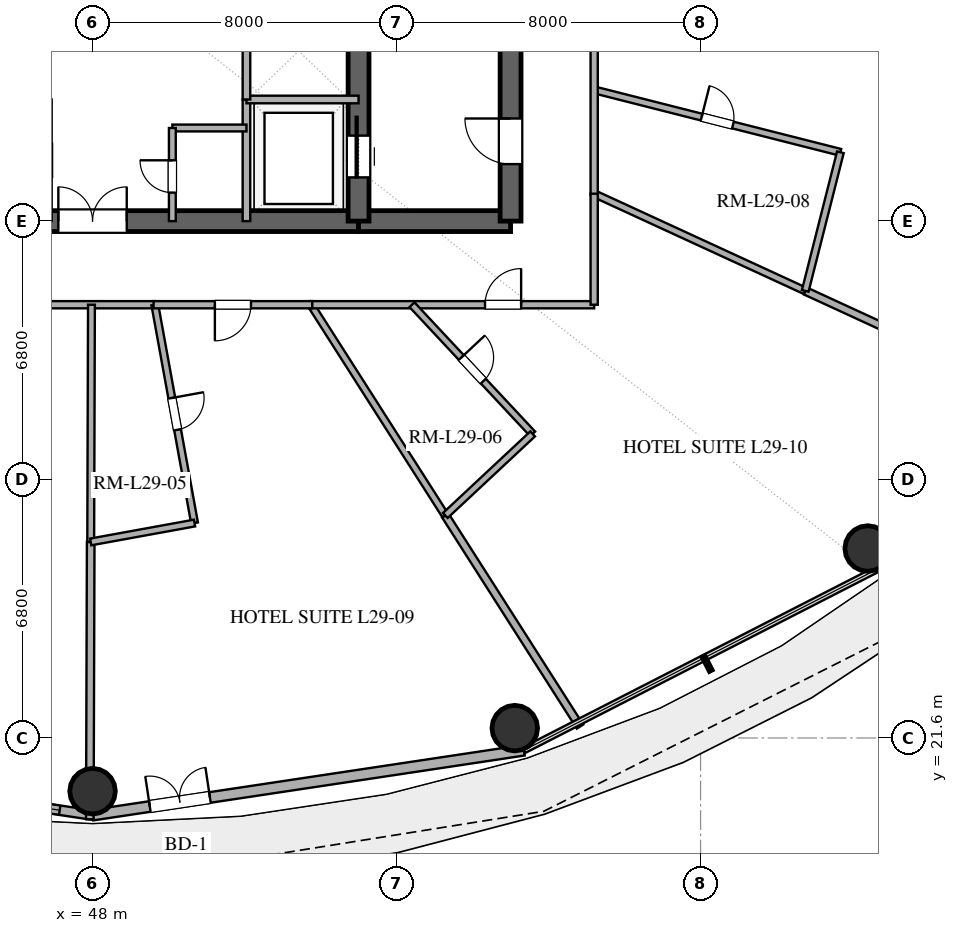
"""IFC4 building model, lengths in metres.
Left out: names, types, materials, properties, quantities, classifications, styles, units other than length and angle.
Written with IfcOpenShell. Run it as: python <this file> out.ifc"""

import sys

from ifc_helpers import new_model, si_unit, direction, frame, frame_2d, origin, origin_2d, place, context, subcontext, project, spatial, rectangle, hollow_circle, extrude, element, fill, save


model = new_model("IFC4")
c1 = context("Model", 3, precision=1e-05, world=origin(), true_north=direction((0.0, 1.0)))
c2 = subcontext(c1, "Body", "Model", "MODEL_VIEW")
j1 = project(units=[si_unit("LENGTHUNIT", "METRE"), si_unit("PLANEANGLEUNIT", "RADIAN")], contexts=[c1])
p1 = place(None, origin())
s1 = spatial("IfcSite", under=j1, at=p1, CompositionType="ELEMENT")
p2 = place(p1, origin())
s2 = spatial("IfcBuilding", under=s1, at=p2, CompositionType="ELEMENT")
p3 = place(p2, frame((0.0, 0.0, 116.4)))
s3 = spatial("IfcBuildingStorey", under=s2, at=p3, CompositionType="ELEMENT", Elevation=116.4)
p4 = place(p3, frame((41.0, 35.2, 0.0), z_axis=(0.0, 0.0, 1.0), x_axis=(1.0, 0.0, 0.0)))
e1 = element("IfcWall", 1, at=p4, inside=s3, PredefinedType="SHEAR", context=c2, shape_type="SweptSolid", body=[
    extrude(rectangle(XDim=14.0, YDim=0.55, at=frame_2d((7.0, 0.0))), origin(), (0.0, 0.0, 1.0), 3.38),
])
p5 = place(p4, frame((6.1, 0.0, 0.0)))
e2 = element("IfcOpeningElement", 2, at=p5, cuts=e1, PredefinedType="OPENING", context=c2, shape_type="SweptSolid", body=[
    extrude(rectangle(XDim=1.8, YDim=2.25, at=frame_2d((0.9, 1.125))), frame((0.0, 0.285, 0.0), z_axis=(0.0, -1.0, 0.0), x_axis=(1.0, 0.0, 0.0)), (0.0, 0.0, 1.0), 0.57),
])
p6 = place(p3, frame((55.0, 35.2, 0.0), z_axis=(0.0, 0.0, 1.0), x_axis=(1.0, 0.0, 0.0)))
e3 = element("IfcWall", 3, at=p6, inside=s3, PredefinedType="SHEAR", context=c2, shape_type="SweptSolid", body=[
    extrude(rectangle(XDim=4.0, YDim=0.55, at=frame_2d((2.0, 0.0))), origin(), (0.0, 0.0, 1.0), 3.38),
])
p7 = place(p3, frame((59.0, 35.2, 0.0), z_axis=(0.0, 0.0, 1.0), x_axis=(0.0, 1.0, 0.0)))
e4 = element("IfcWall", 4, at=p7, inside=s3, PredefinedType="SHEAR", context=c2, shape_type="SweptSolid", body=[
    extrude(rectangle(XDim=13.6, YDim=0.55, at=frame_2d((6.8, 0.0))), origin(), (0.0, 0.0, 1.0), 3.38),
])
p8 = place(p7, frame((1.5, 0.0, 0.0)))
e5 = element("IfcOpeningElement", 5, at=p8, cuts=e4, PredefinedType="OPENING", context=c2, shape_type="SweptSolid", body=[
    extrude(rectangle(XDim=1.2, YDim=2.15, at=frame_2d((0.6, 1.075))), frame((0.0, 0.285, 0.0), z_axis=(0.0, -1.0, 0.0), x_axis=(1.0, 0.0, 0.0)), (0.0, 0.0, 1.0), 0.57),
])
p9 = place(p3, frame((55.0, 35.2, 0.0), z_axis=(0.0, 0.0, 1.0), x_axis=(0.0, 1.0, 0.0)))
e6 = element("IfcWall", 6, at=p9, inside=s3, PredefinedType="SHEAR", context=c2, shape_type="SweptSolid", body=[
    extrude(rectangle(XDim=13.6, YDim=0.55, at=frame_2d((6.8, 0.0))), origin(), (0.0, 0.0, 1.0), 3.38),
])
p10 = place(p9, frame((1.15, 0.0, 0.0)))
e7 = element("IfcOpeningElement", 7, at=p10, cuts=e6, PredefinedType="OPENING", context=c2, shape_type="SweptSolid", body=[
    extrude(rectangle(XDim=1.1, YDim=2.2, at=frame_2d((0.55, 1.1))), frame((0.0, 0.285, 0.0), z_axis=(0.0, -1.0, 0.0), x_axis=(1.0, 0.0, 0.0)), (0.0, 0.0, 1.0), 0.57),
])
for number, where, z_axis, x_axis in (
    (8, (48.0, 20.2, 0.0), (0.0, 0.0, 1.0), (1.0, 0.0, 0.0)),
    (9, (59.11, 21.859, 0.0), (0.0, 0.0, 1.0), (1.0, 0.0, 0.0)),
    (10, (68.398, 26.585, 0.0), (0.0, 0.0, 1.0), (1.0, 0.0, 0.0)),
):
    element("IfcColumn", number, at=place(p3, frame(where, z_axis=z_axis, x_axis=x_axis)), inside=s3, PredefinedType="COLUMN", context=c2, shape_type="SweptSolid", body=[
        extrude(hollow_circle(Radius=0.6, WallThickness=0.032, at=origin_2d()), origin(), (0.0, 0.0, 1.0), 3.38),
    ])
p11 = place(p3, frame((36.649, 21.277, 0.0), z_axis=(0.0, 0.0, 1.0), x_axis=(0.988877774656, -0.148730450117, 0.0)))
e11 = element("IfcWall", 11, at=p11, inside=s3, PredefinedType="SOLIDWALL", context=c2, shape_type="SweptSolid", body=[
    extrude(rectangle(XDim=11.479, YDim=0.25, at=frame_2d((5.74, 0.0))), origin(), (0.0, 0.0, 1.0), 3.38),
])
p12 = place(p11, frame((9.605, 0.0, 1.42)))
e12 = element("IfcOpeningElement", 12, at=p12, cuts=e11, PredefinedType="OPENING", context=c2, shape_type="SweptSolid", body=[
    extrude(rectangle(XDim=1.0, YDim=1.05, at=frame_2d((0.5, 0.525))), frame((0.0, 0.135, 0.0), z_axis=(0.0, -1.0, 0.0), x_axis=(1.0, 0.0, 0.0)), (0.0, 0.0, 1.0), 0.27),
])
p13 = place(p3, frame((48.0, 19.57, 0.0), z_axis=(0.0, 0.0, 1.0), x_axis=(0.988877774656, 0.148730450117, 0.0)))
e13 = element("IfcWall", 13, at=p13, inside=s3, PredefinedType="SOLIDWALL", context=c2, shape_type="SweptSolid", body=[
    extrude(rectangle(XDim=11.479, YDim=0.28, at=frame_2d((5.74, 0.0))), origin(), (0.0, 0.0, 1.0), 3.38),
])
p14 = place(p13, frame((1.524, 0.0, 0.0)))
e14 = element("IfcOpeningElement", 14, at=p14, cuts=e13, PredefinedType="OPENING", context=c2, shape_type="SweptSolid", body=[
    extrude(rectangle(XDim=1.6, YDim=2.25, at=frame_2d((0.8, 1.125))), frame((0.0, 0.15, 0.0), z_axis=(0.0, -1.0, 0.0), x_axis=(1.0, 0.0, 0.0)), (0.0, 0.0, 1.0), 0.3),
])
p15 = place(p3, frame((52.05, 35.2, 0.0), z_axis=(0.0, 0.0, 1.0), x_axis=(0.0, 1.0, 0.0)))
e15 = element("IfcWall", 15, at=p15, inside=s3, PredefinedType="SOLIDWALL", context=c2, shape_type="SweptSolid", body=[
    extrude(rectangle(XDim=3.2, YDim=0.2, at=frame_2d((1.6, 0.0))), origin(), (0.0, 0.0, 1.0), 2.74),
])
p16 = place(p3, frame((52.05, 38.4, 0.0), z_axis=(0.0, 0.0, 1.0), x_axis=(1.0, 0.0, 0.0)))
e16 = element("IfcWall", 16, at=p16, inside=s3, PredefinedType="SOLIDWALL", context=c2, shape_type="SweptSolid", body=[
    extrude(rectangle(XDim=2.95, YDim=0.2, at=frame_2d((1.475, 0.0))), origin(), (0.0, 0.0, 1.0), 2.74),
])
p17 = place(p3, frame((52.05, 38.4, 0.0), z_axis=(0.0, 0.0, 1.0), x_axis=(0.0, 1.0, 0.0)))
e17 = element("IfcWall", 17, at=p17, inside=s3, PredefinedType="SOLIDWALL", context=c2, shape_type="SweptSolid", body=[
    extrude(rectangle(XDim=10.4, YDim=0.2, at=frame_2d((5.2, 0.0))), origin(), (0.0, 0.0, 1.0), 2.74),
])
p18 = place(p17, frame((8.2, 0.0, 0.0)))
e18 = element("IfcOpeningElement", 18, at=p18, cuts=e17, PredefinedType="OPENING", context=c2, shape_type="SweptSolid", body=[
    extrude(rectangle(XDim=1.2, YDim=2.2, at=frame_2d((0.6, 1.1))), frame((0.0, 0.11, 0.0), z_axis=(0.0, -1.0, 0.0), x_axis=(1.0, 0.0, 0.0)), (0.0, 0.0, 1.0), 0.22),
])
p19 = place(p3, frame((50.1, 37.65, 0.0), z_axis=(0.0, 0.0, 1.0), x_axis=(1.0, 0.0, 0.0)))
e19 = element("IfcWall", 19, at=p19, inside=s3, PredefinedType="PLUMBINGWALL", context=c2, shape_type="SweptSolid", body=[
    extrude(rectangle(XDim=1.95, YDim=0.18, at=frame_2d((0.975, 0.0))), origin(), (0.0, 0.0, 1.0), 2.74),
])
p20 = place(p3, frame((50.1, 35.2, 0.0), z_axis=(0.0, 0.0, 1.0), x_axis=(0.0, 1.0, 0.0)))
e20 = element("IfcWall", 20, at=p20, inside=s3, PredefinedType="PLUMBINGWALL", context=c2, shape_type="SweptSolid", body=[
    extrude(rectangle(XDim=2.45, YDim=0.18, at=frame_2d((1.225, 0.0))), origin(), (0.0, 0.0, 1.0), 2.74),
])
p21 = place(p20, frame((0.75, 0.0, 0.0)))
e21 = element("IfcOpeningElement", 21, at=p21, cuts=e20, PredefinedType="OPENING", context=c2, shape_type="SweptSolid", body=[
    extrude(rectangle(XDim=0.85, YDim=2.1, at=frame_2d((0.425, 1.05))), frame((0.0, 0.1, 0.0), z_axis=(0.0, -1.0, 0.0), x_axis=(1.0, 0.0, 0.0)), (0.0, 0.0, 1.0), 0.2),
])
p22 = place(p3, frame((47.928, 19.461, 0.0), z_axis=(0.0, 0.0, 1.0), x_axis=(0.003178198127, 0.999994949516, 0.0)))
e22 = element("IfcWall", 22, at=p22, inside=s3, PredefinedType="PARTITIONING", context=c2, shape_type="SweptSolid", body=[
    extrude(rectangle(XDim=7.298, YDim=0.2, at=frame_2d((3.649, 0.0))), origin(), (0.0, 0.0, 1.0), 2.74),
])
p23 = place(p3, frame((49.671, 33.0, 0.0), z_axis=(0.0, 0.0, 1.0), x_axis=(-1.0, 0.0, 0.0)))
e23 = element("IfcWall", 23, at=p23, inside=s3, PredefinedType="PARTITIONING", context=c2, shape_type="SweptSolid", body=[
    extrude(rectangle(XDim=14.871, YDim=0.19, at=frame_2d((7.436, 0.0))), origin(), (0.0, 0.0, 1.0), 2.74),
])
p24 = place(p23, frame((10.576, 0.0, 0.0)))
e24 = element("IfcOpeningElement", 24, at=p24, cuts=e23, PredefinedType="OPENING", context=c2, shape_type="SweptSolid", body=[
    extrude(rectangle(XDim=0.95, YDim=2.15, at=frame_2d((0.475, 1.075))), frame((0.0, 0.105, 0.0), z_axis=(0.0, -1.0, 0.0), x_axis=(1.0, 0.0, 0.0)), (0.0, 0.0, 1.0), 0.21),
])
p25 = place(p23, frame((4.101, 0.0, 0.0)))
e25 = element("IfcOpeningElement", 25, at=p25, cuts=e23, PredefinedType="OPENING", context=c2, shape_type="SweptSolid", body=[
    extrude(rectangle(XDim=1.0, YDim=2.2, at=frame_2d((0.5, 1.1))), frame((0.0, 0.105, 0.0), z_axis=(0.0, -1.0, 0.0), x_axis=(1.0, 0.0, 0.0)), (0.0, 0.0, 1.0), 0.21),
])
p26 = place(p3, frame((61.2, 38.653, 0.0), z_axis=(0.0, 0.0, 1.0), x_axis=(0.96932048276, -0.24580032893, 0.0)))
e26 = element("IfcWall", 26, at=p26, inside=s3, PredefinedType="PLUMBINGWALL", context=c2, shape_type="SweptSolid", body=[
    extrude(rectangle(XDim=6.684, YDim=0.18, at=frame_2d((3.342, 0.0))), origin(), (0.0, 0.0, 1.0), 2.74),
])
p27 = place(p26, frame((2.917, 0.0, 0.0)))
e27 = element("IfcOpeningElement", 27, at=p27, cuts=e26, PredefinedType="OPENING", context=c2, shape_type="SweptSolid", body=[
    extrude(rectangle(XDim=0.85, YDim=2.1, at=frame_2d((0.425, 1.05))), frame((0.0, 0.1, 0.0), z_axis=(0.0, -1.0, 0.0), x_axis=(1.0, 0.0, 0.0)), (0.0, 0.0, 1.0), 0.2),
])
p28 = place(p3, frame((60.828, 21.9, 0.0), z_axis=(0.0, 0.0, 1.0), x_axis=(-0.537968238966, 0.842965108331, 0.0)))
e28 = element("IfcWall", 28, at=p28, inside=s3, PredefinedType="PARTITIONING", context=c2, shape_type="SweptSolid", body=[
    extrude(rectangle(XDim=6.589, YDim=0.2, at=frame_2d((3.295, 0.0))), origin(), (0.0, 0.0, 1.0), 2.74),
])
p29 = place(p3, frame((57.283, 27.454, 0.0), z_axis=(0.0, 0.0, 1.0), x_axis=(-0.537984400251, 0.842954794213, 0.0)))
e29 = element("IfcWall", 29, at=p29, inside=s3, PredefinedType="PLUMBINGWALL", context=c2, shape_type="SweptSolid", body=[
    extrude(rectangle(XDim=6.579, YDim=0.18, at=frame_2d((3.29, 0.0))), origin(), (0.0, 0.0, 1.0), 2.74),
])
p30 = place(p3, frame((72.701, 30.624, 0.0), z_axis=(0.0, 0.0, 1.0), x_axis=(-0.9083071886, 0.418303778536, 0.0)))
e30 = element("IfcWall", 30, at=p30, inside=s3, PredefinedType="PARTITIONING", context=c2, shape_type="SweptSolid", body=[
    extrude(rectangle(XDim=6.548, YDim=0.2, at=frame_2d((3.274, 0.0))), origin(), (0.0, 0.0, 1.0), 2.74),
])
p31 = place(p3, frame((47.952, 26.758, 0.0), z_axis=(0.0, 0.0, 1.0), x_axis=(0.003168254458, 0.999994981069, 0.0)))
e31 = element("IfcWall", 31, at=p31, inside=s3, PredefinedType="PLUMBINGWALL", context=c2, shape_type="SweptSolid", body=[
    extrude(rectangle(XDim=6.242, YDim=0.18, at=frame_2d((3.121, 0.0))), origin(), (0.0, 0.0, 1.0), 2.74),
])
p32 = place(p3, frame((66.754, 33.363, 0.0), z_axis=(0.0, 0.0, 1.0), x_axis=(-0.908301480607, 0.418316172681, 0.0)))
e32 = element("IfcWall", 32, at=p32, inside=s3, PredefinedType="PLUMBINGWALL", context=c2, shape_type="SweptSolid", body=[
    extrude(rectangle(XDim=6.115, YDim=0.18, at=frame_2d((3.057, 0.0))), origin(), (0.0, 0.0, 1.0), 2.74),
])
p33 = place(p3, frame((49.638, 33.0, 0.0), z_axis=(0.0, 0.0, 1.0), x_axis=(0.179135653645, -0.983824383512, 0.0)))
e33 = element("IfcWall", 33, at=p33, inside=s3, PredefinedType="PLUMBINGWALL", context=c2, shape_type="SweptSolid", body=[
    extrude(rectangle(XDim=5.839, YDim=0.18, at=frame_2d((2.919, 0.0))), origin(), (0.0, 0.0, 1.0), 2.74),
])
p34 = place(p33, frame((2.494, 0.0, 0.0)))
e34 = element("IfcOpeningElement", 34, at=p34, cuts=e33, PredefinedType="OPENING", context=c2, shape_type="SweptSolid", body=[
    extrude(rectangle(XDim=0.85, YDim=2.1, at=frame_2d((0.425, 1.05))), frame((0.0, 0.1, 0.0), z_axis=(0.0, -1.0, 0.0), x_axis=(1.0, 0.0, 0.0)), (0.0, 0.0, 1.0), 0.2),
])
p35 = place(p3, frame((61.2, 46.45, 0.0), z_axis=(0.0, 0.0, 1.0), x_axis=(0.0, -1.0, 0.0)))
e35 = element("IfcWall", 35, at=p35, inside=s3, PredefinedType="PARTITIONING", context=c2, shape_type="SweptSolid", body=[
    extrude(rectangle(XDim=10.564, YDim=0.19, at=frame_2d((5.282, 0.0))), origin(), (0.0, 0.0, 1.0), 2.74),
])
p36 = place(p35, frame((4.722, 0.0, 0.0)))
e36 = element("IfcOpeningElement", 36, at=p36, cuts=e35, PredefinedType="OPENING", context=c2, shape_type="SweptSolid", body=[
    extrude(rectangle(XDim=0.95, YDim=2.15, at=frame_2d((0.475, 1.075))), frame((0.0, 0.105, 0.0), z_axis=(0.0, -1.0, 0.0), x_axis=(1.0, 0.0, 0.0)), (0.0, 0.0, 1.0), 0.21),
])
p37 = place(p3, frame((53.706, 33.0, 0.0), z_axis=(0.0, 0.0, 1.0), x_axis=(1.0, 0.0, 0.0)))
e37 = element("IfcWall", 37, at=p37, inside=s3, PredefinedType="PARTITIONING", context=c2, shape_type="SweptSolid", body=[
    extrude(rectangle(XDim=7.494, YDim=0.19, at=frame_2d((3.747, 0.0))), origin(), (0.0, 0.0, 1.0), 2.74),
])
p38 = place(p37, frame((4.622, 0.0, 0.0)))
e38 = element("IfcOpeningElement", 38, at=p38, cuts=e37, PredefinedType="OPENING", context=c2, shape_type="SweptSolid", body=[
    extrude(rectangle(XDim=0.95, YDim=2.15, at=frame_2d((0.475, 1.075))), frame((0.0, 0.105, 0.0), z_axis=(0.0, -1.0, 0.0), x_axis=(1.0, 0.0, 0.0)), (0.0, 0.0, 1.0), 0.21),
])
p39 = place(p3, frame((56.406, 33.0, 0.0), z_axis=(0.0, 0.0, 1.0), x_axis=(0.682578142961, -0.730812615348, 0.0)))
e39 = element("IfcWall", 39, at=p39, inside=s3, PredefinedType="PLUMBINGWALL", context=c2, shape_type="SweptSolid", body=[
    extrude(rectangle(XDim=4.652, YDim=0.18, at=frame_2d((2.326, 0.0))), origin(), (0.0, 0.0, 1.0), 2.74),
])
p40 = place(p39, frame((1.901, 0.0, 0.0)))
e40 = element("IfcOpeningElement", 40, at=p40, cuts=e39, PredefinedType="OPENING", context=c2, shape_type="SweptSolid", body=[
    extrude(rectangle(XDim=0.85, YDim=2.1, at=frame_2d((0.425, 1.05))), frame((0.0, 0.1, 0.0), z_axis=(0.0, -1.0, 0.0), x_axis=(1.0, 0.0, 0.0)), (0.0, 0.0, 1.0), 0.2),
])
p41 = place(p3, frame((53.782, 33.0, 0.0), z_axis=(0.0, 0.0, 1.0), x_axis=(-1.0, 0.0, 0.0)))
e41 = element("IfcWall", 41, at=p41, inside=s3, PredefinedType="PARTITIONING", context=c2, shape_type="SweptSolid", body=[
    extrude(rectangle(XDim=4.176, YDim=0.19, at=frame_2d((2.088, 0.0))), origin(), (0.0, 0.0, 1.0), 2.74),
])
p42 = place(p41, frame((1.613, 0.0, 0.0)))
e42 = element("IfcOpeningElement", 42, at=p42, cuts=e41, PredefinedType="OPENING", context=c2, shape_type="SweptSolid", body=[
    extrude(rectangle(XDim=0.95, YDim=2.15, at=frame_2d((0.475, 1.075))), frame((0.0, 0.105, 0.0), z_axis=(0.0, -1.0, 0.0), x_axis=(1.0, 0.0, 0.0)), (0.0, 0.0, 1.0), 0.21),
])
p43 = place(p3, frame((67.678, 37.01, 0.0), z_axis=(0.0, 0.0, 1.0), x_axis=(-0.245725202551, -0.969339530212, 0.0)))
e43 = element("IfcWall", 43, at=p43, inside=s3, PredefinedType="PLUMBINGWALL", context=c2, shape_type="SweptSolid", body=[
    extrude(rectangle(XDim=3.763, YDim=0.18, at=frame_2d((1.881, 0.0))), origin(), (0.0, 0.0, 1.0), 2.74),
])
p44 = place(p3, frame((59.581, 29.601, 0.0), z_axis=(0.0, 0.0, 1.0), x_axis=(-0.730840933831, -0.682547822088, 0.0)))
e44 = element("IfcWall", 44, at=p44, inside=s3, PredefinedType="PLUMBINGWALL", context=c2, shape_type="SweptSolid", body=[
    extrude(rectangle(XDim=3.145, YDim=0.18, at=frame_2d((1.572, 0.0))), origin(), (0.0, 0.0, 1.0), 2.74),
])
p45 = place(p3, frame((61.2, 33.0, 0.0), z_axis=(0.0, 0.0, 1.0), x_axis=(0.0, 1.0, 0.0)))
e45 = element("IfcWall", 45, at=p45, inside=s3, PredefinedType="PARTITIONING", context=c2, shape_type="SweptSolid", body=[
    extrude(rectangle(XDim=2.921, YDim=0.19, at=frame_2d((1.46, 0.0))), origin(), (0.0, 0.0, 1.0), 2.74),
])
p46 = place(p3, frame((50.684, 27.256, 0.0), z_axis=(0.0, 0.0, 1.0), x_axis=(-0.983824875987, -0.17913294892, 0.0)))
e46 = element("IfcWall", 46, at=p46, inside=s3, PredefinedType="PLUMBINGWALL", context=c2, shape_type="SweptSolid", body=[
    extrude(rectangle(XDim=2.778, YDim=0.18, at=frame_2d((1.389, 0.0))), origin(), (0.0, 0.0, 1.0), 2.74),
])
p47 = place(p14, origin())
e47 = element("IfcDoor", 47, at=p47, inside=s3, OperationType="DOUBLE_DOOR_SINGLE_SWING", PredefinedType="DOOR", context=c2, shape_type="SweptSolid", body=[
    extrude(rectangle(XDim=1.6, YDim=2.25, at=frame_2d((0.8, 1.125))), frame((0.0, 0.025, 0.0), z_axis=(0.0, -1.0, 0.0), x_axis=(1.0, 0.0, 0.0)), (0.0, 0.0, 1.0), 0.05),
])
fill(e14, e47)
p48 = place(p12, origin())
e48 = element("IfcWindow", 48, at=p48, inside=s3, PartitioningType="SINGLE_PANEL", PredefinedType="WINDOW", context=c2, shape_type="SweptSolid", body=[
    extrude(rectangle(XDim=1.0, YDim=1.05, at=frame_2d((0.5, 0.525))), frame((0.0, 0.03, 0.0), z_axis=(0.0, -1.0, 0.0), x_axis=(1.0, 0.0, 0.0)), (0.0, 0.0, 1.0), 0.06),
])
fill(e12, e48)
p49 = place(p10, origin())
e49 = element("IfcDoor", 49, at=p49, inside=s3, OperationType="SLIDING_TO_RIGHT", PredefinedType="DOOR", context=c2, shape_type="SweptSolid", body=[
    extrude(rectangle(XDim=1.1, YDim=2.2, at=frame_2d((0.55, 1.1))), frame((0.0, 0.025, 0.0), z_axis=(0.0, -1.0, 0.0), x_axis=(1.0, 0.0, 0.0)), (0.0, 0.0, 1.0), 0.05),
])
fill(e7, e49)
p50 = place(p8, origin())
e50 = element("IfcDoor", 50, at=p50, inside=s3, OperationType="SINGLE_SWING_RIGHT", PredefinedType="DOOR", context=c2, shape_type="SweptSolid", body=[
    extrude(rectangle(XDim=1.2, YDim=2.15, at=frame_2d((0.6, 1.075))), frame((0.0, 0.025, 0.0), z_axis=(0.0, -1.0, 0.0), x_axis=(1.0, 0.0, 0.0)), (0.0, 0.0, 1.0), 0.05),
])
fill(e5, e50)
p51 = place(p5, origin())
e51 = element("IfcDoor", 51, at=p51, inside=s3, OperationType="DOUBLE_DOOR_SINGLE_SWING", PredefinedType="DOOR", context=c2, shape_type="SweptSolid", body=[
    extrude(rectangle(XDim=1.8, YDim=2.25, at=frame_2d((0.9, 1.125))), frame((0.0, 0.025, 0.0), z_axis=(0.0, -1.0, 0.0), x_axis=(1.0, 0.0, 0.0)), (0.0, 0.0, 1.0), 0.05),
])
fill(e2, e51)
p52 = place(p21, origin())
e52 = element("IfcDoor", 52, at=p52, inside=s3, OperationType="SINGLE_SWING_RIGHT", PredefinedType="DOOR", context=c2, shape_type="SweptSolid", body=[
    extrude(rectangle(XDim=0.85, YDim=2.1, at=frame_2d((0.425, 1.05))), frame((0.0, 0.025, 0.0), z_axis=(0.0, -1.0, 0.0), x_axis=(1.0, 0.0, 0.0)), (0.0, 0.0, 1.0), 0.05),
])
fill(e21, e52)
p53 = place(p27, origin())
e53 = element("IfcDoor", 53, at=p53, inside=s3, OperationType="SINGLE_SWING_LEFT", PredefinedType="DOOR", context=c2, shape_type="SweptSolid", body=[
    extrude(rectangle(XDim=0.85, YDim=2.1, at=frame_2d((0.425, 1.05))), frame((0.0, 0.025, 0.0), z_axis=(0.0, -1.0, 0.0), x_axis=(1.0, 0.0, 0.0)), (0.0, 0.0, 1.0), 0.05),
])
fill(e27, e53)
p54 = place(p34, origin())
e54 = element("IfcDoor", 54, at=p54, inside=s3, OperationType="SINGLE_SWING_LEFT", PredefinedType="DOOR", context=c2, shape_type="SweptSolid", body=[
    extrude(rectangle(XDim=0.85, YDim=2.1, at=frame_2d((0.425, 1.05))), frame((0.0, 0.025, 0.0), z_axis=(0.0, -1.0, 0.0), x_axis=(1.0, 0.0, 0.0)), (0.0, 0.0, 1.0), 0.05),
])
fill(e34, e54)
p55 = place(p38, origin())
e55 = element("IfcDoor", 55, at=p55, inside=s3, OperationType="SINGLE_SWING_RIGHT", PredefinedType="DOOR", context=c2, shape_type="SweptSolid", body=[
    extrude(rectangle(XDim=0.95, YDim=2.15, at=frame_2d((0.475, 1.075))), frame((0.0, 0.025, 0.0), z_axis=(0.0, -1.0, 0.0), x_axis=(1.0, 0.0, 0.0)), (0.0, 0.0, 1.0), 0.05),
])
fill(e38, e55)
p56 = place(p40, origin())
e56 = element("IfcDoor", 56, at=p56, inside=s3, OperationType="SINGLE_SWING_LEFT", PredefinedType="DOOR", context=c2, shape_type="SweptSolid", body=[
    extrude(rectangle(XDim=0.85, YDim=2.1, at=frame_2d((0.425, 1.05))), frame((0.0, 0.025, 0.0), z_axis=(0.0, -1.0, 0.0), x_axis=(1.0, 0.0, 0.0)), (0.0, 0.0, 1.0), 0.05),
])
fill(e40, e56)
p57 = place(p42, origin())
e57 = element("IfcDoor", 57, at=p57, inside=s3, OperationType="SINGLE_SWING_RIGHT", PredefinedType="DOOR", context=c2, shape_type="SweptSolid", body=[
    extrude(rectangle(XDim=0.95, YDim=2.15, at=frame_2d((0.475, 1.075))), frame((0.0, 0.025, 0.0), z_axis=(0.0, -1.0, 0.0), x_axis=(1.0, 0.0, 0.0)), (0.0, 0.0, 1.0), 0.05),
])
fill(e42, e57)
save(model, sys.argv[1])
